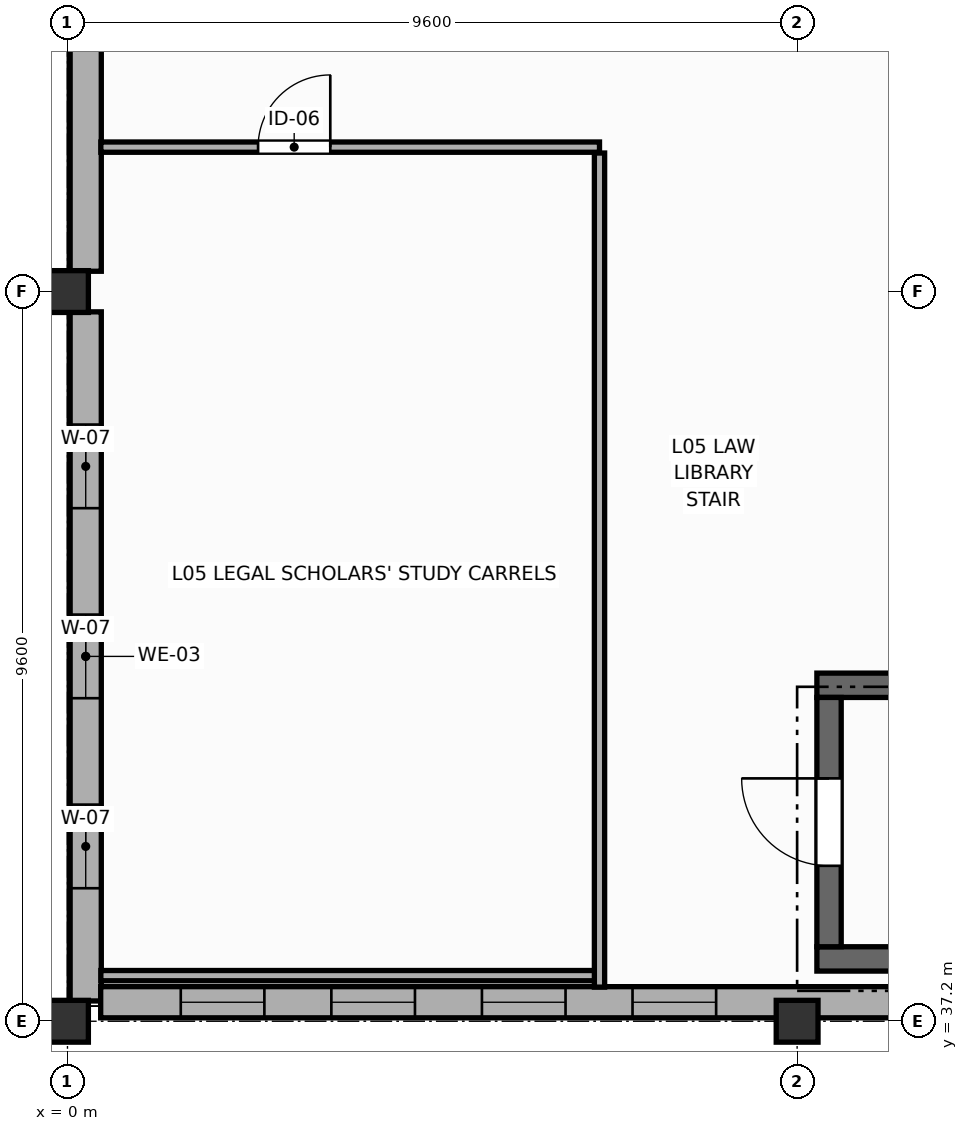
"""IFC4 building model, lengths in metres.
Left out: names, types, materials, properties, quantities, classifications, styles, units other than length and angle.
Written with IfcOpenShell. Run it as: python <this file> out.ifc"""

import sys

from ifc_helpers import new_model, si_unit, direction, frame, frame_2d, origin, origin_2d, place, context, subcontext, project, spatial, rectangle, extrude, element, fill, save


model = new_model("IFC4")
c1 = context("Model", 3, precision=1e-05, world=origin(), true_north=direction((0.0, 1.0)))
c2 = subcontext(c1, "Body", "Model", "MODEL_VIEW")
j1 = project(units=[si_unit("LENGTHUNIT", "METRE"), si_unit("PLANEANGLEUNIT", "RADIAN")], contexts=[c1])
p1 = place(None, origin())
s1 = spatial("IfcSite", under=j1, at=p1, CompositionType="ELEMENT")
p2 = place(p1, origin())
s2 = spatial("IfcBuilding", under=s1, at=p2, CompositionType="ELEMENT")
p3 = place(p2, frame((0.0, 0.0, 18.6)))
s3 = spatial("IfcBuildingStorey", under=s2, at=p3, CompositionType="ELEMENT", Elevation=18.6)
for number, where, z_axis, x_axis in (
    (1, (0.0, 37.2, 0.0), (0.0, 0.0, 1.0), (1.0, 0.0, 0.0)),
    (2, (0.0, 46.8, 0.0), (0.0, 0.0, 1.0), (1.0, 0.0, 0.0)),
    (3, (9.6, 37.2, 0.0), (0.0, 0.0, 1.0), (1.0, 0.0, 0.0)),
):
    element("IfcColumn", number, at=place(p3, frame(where, z_axis=z_axis, x_axis=x_axis)), inside=s3, PredefinedType="COLUMN", context=c2, shape_type="SweptSolid", body=[
        extrude(rectangle(XDim=0.55, YDim=0.55, at=origin_2d()), origin(), (0.0, 0.0, 1.0), 4.2),
    ])
p4 = place(p3, frame((0.24, 37.467, 0.0), z_axis=(0.0, 0.0, 1.0), x_axis=(0.0, 1.0, 0.0)))
e4 = element("IfcWall", 4, at=p4, inside=s3, PredefinedType="STANDARD", context=c2, shape_type="SweptSolid", body=[
    extrude(rectangle(XDim=9.066, YDim=0.41, at=frame_2d((4.533, 0.0))), origin(), (0.0, 0.0, 1.0), 3.14),
])
p5 = place(p4, frame((1.483, 0.0, 0.9)))
e5 = element("IfcOpeningElement", 5, at=p5, cuts=e4, PredefinedType="OPENING", context=c2, shape_type="SweptSolid", body=[
    extrude(rectangle(XDim=1.1, YDim=1.85, at=frame_2d((0.55, 0.925))), frame((0.0, 0.215, 0.0), z_axis=(0.0, -1.0, 0.0), x_axis=(1.0, 0.0, 0.0)), (0.0, 0.0, 1.0), 0.43),
])
p6 = place(p4, frame((3.983, 0.0, 0.9)))
e6 = element("IfcOpeningElement", 6, at=p6, cuts=e4, PredefinedType="OPENING", context=c2, shape_type="SweptSolid", body=[
    extrude(rectangle(XDim=1.1, YDim=1.85, at=frame_2d((0.55, 0.925))), frame((0.0, 0.215, 0.0), z_axis=(0.0, -1.0, 0.0), x_axis=(1.0, 0.0, 0.0)), (0.0, 0.0, 1.0), 0.43),
])
p7 = place(p4, frame((6.483, 0.0, 0.9)))
e7 = element("IfcOpeningElement", 7, at=p7, cuts=e4, PredefinedType="OPENING", context=c2, shape_type="SweptSolid", body=[
    extrude(rectangle(XDim=1.1, YDim=1.85, at=frame_2d((0.55, 0.925))), frame((0.0, 0.215, 0.0), z_axis=(0.0, -1.0, 0.0), x_axis=(1.0, 0.0, 0.0)), (0.0, 0.0, 1.0), 0.43),
])
p8 = place(p3, frame((0.24, 47.067, 0.0), z_axis=(0.0, 0.0, 1.0), x_axis=(0.0, 1.0, 0.0)))
e8 = element("IfcWall", 8, at=p8, inside=s3, PredefinedType="STANDARD", context=c2, shape_type="SweptSolid", body=[
    extrude(rectangle(XDim=9.066, YDim=0.41, at=frame_2d((4.533, 0.0))), origin(), (0.0, 0.0, 1.0), 3.14),
])
p9 = place(p8, frame((6.483, 0.0, 0.9)))
e9 = element("IfcOpeningElement", 9, at=p9, cuts=e8, PredefinedType="OPENING", context=c2, shape_type="SweptSolid", body=[
    extrude(rectangle(XDim=1.1, YDim=1.85, at=frame_2d((0.55, 0.925))), frame((0.0, 0.215, 0.0), z_axis=(0.0, -1.0, 0.0), x_axis=(1.0, 0.0, 0.0)), (0.0, 0.0, 1.0), 0.43),
])
p10 = place(p3, frame((33.3, 37.45, 0.0), z_axis=(0.0, 0.0, 1.0), x_axis=(-1.0, 0.0, 0.0)))
e10 = element("IfcWall", 10, at=p10, inside=s3, PredefinedType="STANDARD", context=c2, shape_type="SweptSolid", body=[
    extrude(rectangle(XDim=32.863, YDim=0.41, at=frame_2d((16.432, 0.0))), origin(), (0.0, 0.0, 1.0), 2.99),
])
p11 = place(p10, frame((0.99, 0.0, 0.9)))
e11 = element("IfcOpeningElement", 11, at=p11, cuts=e10, PredefinedType="OPENING", context=c2, shape_type="SweptSolid", body=[
    extrude(rectangle(XDim=1.1, YDim=1.85, at=frame_2d((0.55, 0.925))), frame((0.0, 0.215, 0.0), z_axis=(0.0, -1.0, 0.0), x_axis=(1.0, 0.0, 0.0)), (0.0, 0.0, 1.0), 0.43),
])
p12 = place(p10, frame((2.972, 0.0, 0.9)))
e12 = element("IfcOpeningElement", 12, at=p12, cuts=e10, PredefinedType="OPENING", context=c2, shape_type="SweptSolid", body=[
    extrude(rectangle(XDim=1.1, YDim=1.85, at=frame_2d((0.55, 0.925))), frame((0.0, 0.215, 0.0), z_axis=(0.0, -1.0, 0.0), x_axis=(1.0, 0.0, 0.0)), (0.0, 0.0, 1.0), 0.43),
])
p13 = place(p10, frame((4.953, 0.0, 0.9)))
e13 = element("IfcOpeningElement", 13, at=p13, cuts=e10, PredefinedType="OPENING", context=c2, shape_type="SweptSolid", body=[
    extrude(rectangle(XDim=1.1, YDim=1.85, at=frame_2d((0.55, 0.925))), frame((0.0, 0.215, 0.0), z_axis=(0.0, -1.0, 0.0), x_axis=(1.0, 0.0, 0.0)), (0.0, 0.0, 1.0), 0.43),
])
p14 = place(p10, frame((6.934, 0.0, 0.9)))
e14 = element("IfcOpeningElement", 14, at=p14, cuts=e10, PredefinedType="OPENING", context=c2, shape_type="SweptSolid", body=[
    extrude(rectangle(XDim=1.1, YDim=1.85, at=frame_2d((0.55, 0.925))), frame((0.0, 0.215, 0.0), z_axis=(0.0, -1.0, 0.0), x_axis=(1.0, 0.0, 0.0)), (0.0, 0.0, 1.0), 0.43),
])
p15 = place(p10, frame((10.897, 0.0, 0.9)))
e15 = element("IfcOpeningElement", 15, at=p15, cuts=e10, PredefinedType="OPENING", context=c2, shape_type="SweptSolid", body=[
    extrude(rectangle(XDim=1.1, YDim=1.85, at=frame_2d((0.55, 0.925))), frame((0.0, 0.215, 0.0), z_axis=(0.0, -1.0, 0.0), x_axis=(1.0, 0.0, 0.0)), (0.0, 0.0, 1.0), 0.43),
])
p16 = place(p10, frame((14.859, 0.0, 0.9)))
e16 = element("IfcOpeningElement", 16, at=p16, cuts=e10, PredefinedType="OPENING", context=c2, shape_type="SweptSolid", body=[
    extrude(rectangle(XDim=1.1, YDim=1.85, at=frame_2d((0.55, 0.925))), frame((0.0, 0.215, 0.0), z_axis=(0.0, -1.0, 0.0), x_axis=(1.0, 0.0, 0.0)), (0.0, 0.0, 1.0), 0.43),
])
p17 = place(p10, frame((16.841, 0.0, 0.9)))
e17 = element("IfcOpeningElement", 17, at=p17, cuts=e10, PredefinedType="OPENING", context=c2, shape_type="SweptSolid", body=[
    extrude(rectangle(XDim=1.1, YDim=1.85, at=frame_2d((0.55, 0.925))), frame((0.0, 0.215, 0.0), z_axis=(0.0, -1.0, 0.0), x_axis=(1.0, 0.0, 0.0)), (0.0, 0.0, 1.0), 0.43),
])
p18 = place(p10, frame((18.822, 0.0, 0.9)))
e18 = element("IfcOpeningElement", 18, at=p18, cuts=e10, PredefinedType="OPENING", context=c2, shape_type="SweptSolid", body=[
    extrude(rectangle(XDim=1.1, YDim=1.85, at=frame_2d((0.55, 0.925))), frame((0.0, 0.215, 0.0), z_axis=(0.0, -1.0, 0.0), x_axis=(1.0, 0.0, 0.0)), (0.0, 0.0, 1.0), 0.43),
])
p19 = place(p10, frame((20.803, 0.0, 0.9)))
e19 = element("IfcOpeningElement", 19, at=p19, cuts=e10, PredefinedType="OPENING", context=c2, shape_type="SweptSolid", body=[
    extrude(rectangle(XDim=1.1, YDim=1.85, at=frame_2d((0.55, 0.925))), frame((0.0, 0.215, 0.0), z_axis=(0.0, -1.0, 0.0), x_axis=(1.0, 0.0, 0.0)), (0.0, 0.0, 1.0), 0.43),
])
p20 = place(p10, frame((24.766, 0.0, 0.9)))
e20 = element("IfcOpeningElement", 20, at=p20, cuts=e10, PredefinedType="OPENING", context=c2, shape_type="SweptSolid", body=[
    extrude(rectangle(XDim=1.1, YDim=1.85, at=frame_2d((0.55, 0.925))), frame((0.0, 0.215, 0.0), z_axis=(0.0, -1.0, 0.0), x_axis=(1.0, 0.0, 0.0)), (0.0, 0.0, 1.0), 0.43),
])
p21 = place(p10, frame((26.747, 0.0, 0.9)))
e21 = element("IfcOpeningElement", 21, at=p21, cuts=e10, PredefinedType="OPENING", context=c2, shape_type="SweptSolid", body=[
    extrude(rectangle(XDim=1.1, YDim=1.85, at=frame_2d((0.55, 0.925))), frame((0.0, 0.215, 0.0), z_axis=(0.0, -1.0, 0.0), x_axis=(1.0, 0.0, 0.0)), (0.0, 0.0, 1.0), 0.43),
])
p22 = place(p10, frame((28.728, 0.0, 0.9)))
e22 = element("IfcOpeningElement", 22, at=p22, cuts=e10, PredefinedType="OPENING", context=c2, shape_type="SweptSolid", body=[
    extrude(rectangle(XDim=1.1, YDim=1.85, at=frame_2d((0.55, 0.925))), frame((0.0, 0.215, 0.0), z_axis=(0.0, -1.0, 0.0), x_axis=(1.0, 0.0, 0.0)), (0.0, 0.0, 1.0), 0.43),
])
p23 = place(p10, frame((30.709, 0.0, 0.9)))
e23 = element("IfcOpeningElement", 23, at=p23, cuts=e10, PredefinedType="OPENING", context=c2, shape_type="SweptSolid", body=[
    extrude(rectangle(XDim=1.1, YDim=1.85, at=frame_2d((0.55, 0.925))), frame((0.0, 0.215, 0.0), z_axis=(0.0, -1.0, 0.0), x_axis=(1.0, 0.0, 0.0)), (0.0, 0.0, 1.0), 0.43),
])
for number, where, z_axis, x_axis in (
    (24, (9.86, 41.62, 0.0), (0.0, 0.0, 1.0), (1.0, 0.0, 0.0)),
    (25, (18.74, 38.02, 0.0), (0.0, 0.0, 1.0), (-1.0, 0.0, 0.0)),
):
    element("IfcWall", number, at=place(p3, frame(where, z_axis=z_axis, x_axis=x_axis)), inside=s3, PredefinedType="SHEAR", context=c2, shape_type="SweptSolid", body=[
        extrude(rectangle(XDim=8.88, YDim=0.32, at=frame_2d((4.44, 0.0))), origin(), (0.0, 0.0, 1.0), 3.96),
    ])
p24 = place(p3, frame((10.02, 38.18, 0.0), z_axis=(0.0, 0.0, 1.0), x_axis=(0.0, 1.0, 0.0)))
e26 = element("IfcWall", 26, at=p24, inside=s3, PredefinedType="SHEAR", context=c2, shape_type="SweptSolid", body=[
    extrude(rectangle(XDim=3.28, YDim=0.32, at=frame_2d((1.64, 0.0))), origin(), (0.0, 0.0, 1.0), 3.96),
])
p25 = place(p24, frame((1.065, 0.0, 0.0)))
e27 = element("IfcOpeningElement", 27, at=p25, cuts=e26, PredefinedType="OPENING", context=c2, shape_type="SweptSolid", body=[
    extrude(rectangle(XDim=1.15, YDim=2.2, at=frame_2d((0.575, 1.1))), frame((0.0, 0.17, 0.0), z_axis=(0.0, -1.0, 0.0), x_axis=(1.0, 0.0, 0.0)), (0.0, 0.0, 1.0), 0.34),
])
p26 = place(p3, frame((0.439, 48.7, 0.0), z_axis=(0.0, 0.0, 1.0), x_axis=(1.0, 0.0, 0.0)))
e28 = element("IfcWall", 28, at=p26, inside=s3, PredefinedType="PARTITIONING", context=c2, shape_type="SweptSolid", body=[
    extrude(rectangle(XDim=6.561, YDim=0.135, at=frame_2d((3.281, 0.0))), origin(), (0.0, 0.0, 1.0), 3.14),
])
p27 = place(p26, frame((2.069, 0.0, 0.0)))
e29 = element("IfcOpeningElement", 29, at=p27, cuts=e28, PredefinedType="OPENING", context=c2, shape_type="SweptSolid", body=[
    extrude(rectangle(XDim=0.95, YDim=2.15, at=frame_2d((0.475, 1.075))), frame((0.0, 0.077, 0.0), z_axis=(0.0, -1.0, 0.0), x_axis=(1.0, 0.0, 0.0)), (0.0, 0.0, 1.0), 0.155),
])
p28 = place(p3, frame((7.0, 37.8, 0.0), z_axis=(0.0, 0.0, 1.0), x_axis=(-1.0, 0.0, 0.0)))
e30 = element("IfcWall", 30, at=p28, inside=s3, PredefinedType="PARTITIONING", context=c2, shape_type="SweptSolid", body=[
    extrude(rectangle(XDim=6.561, YDim=0.135, at=frame_2d((3.281, 0.0))), origin(), (0.0, 0.0, 1.0), 3.14),
])
p29 = place(p3, frame((7.0, 48.623, 0.0), z_axis=(0.0, 0.0, 1.0), x_axis=(0.0, -1.0, 0.0)))
e31 = element("IfcWall", 31, at=p29, inside=s3, PredefinedType="PARTITIONING", context=c2, shape_type="SweptSolid", body=[
    extrude(rectangle(XDim=10.974, YDim=0.135, at=frame_2d((5.487, 0.0))), origin(), (0.0, 0.0, 1.0), 3.945),
])
p30 = place(p5, origin())
e32 = element("IfcWindow", 32, at=p30, inside=s3, PartitioningType="SINGLE_PANEL", PredefinedType="WINDOW", context=c2, shape_type="SweptSolid", body=[
    extrude(rectangle(XDim=1.1, YDim=1.85, at=frame_2d((0.55, 0.925))), frame((0.0, 0.03, 0.0), z_axis=(0.0, -1.0, 0.0), x_axis=(1.0, 0.0, 0.0)), (0.0, 0.0, 1.0), 0.06),
])
fill(e5, e32)
p31 = place(p6, origin())
e33 = element("IfcWindow", 33, at=p31, inside=s3, PartitioningType="SINGLE_PANEL", PredefinedType="WINDOW", context=c2, shape_type="SweptSolid", body=[
    extrude(rectangle(XDim=1.1, YDim=1.85, at=frame_2d((0.55, 0.925))), frame((0.0, 0.03, 0.0), z_axis=(0.0, -1.0, 0.0), x_axis=(1.0, 0.0, 0.0)), (0.0, 0.0, 1.0), 0.06),
])
fill(e6, e33)
p32 = place(p7, origin())
e34 = element("IfcWindow", 34, at=p32, inside=s3, PartitioningType="SINGLE_PANEL", PredefinedType="WINDOW", context=c2, shape_type="SweptSolid", body=[
    extrude(rectangle(XDim=1.1, YDim=1.85, at=frame_2d((0.55, 0.925))), frame((0.0, 0.03, 0.0), z_axis=(0.0, -1.0, 0.0), x_axis=(1.0, 0.0, 0.0)), (0.0, 0.0, 1.0), 0.06),
])
fill(e7, e34)
p33 = place(p20, origin())
e35 = element("IfcWindow", 35, at=p33, inside=s3, PartitioningType="SINGLE_PANEL", PredefinedType="WINDOW", context=c2, shape_type="SweptSolid", body=[
    extrude(rectangle(XDim=1.1, YDim=1.85, at=frame_2d((0.55, 0.925))), frame((0.0, 0.03, 0.0), z_axis=(0.0, -1.0, 0.0), x_axis=(1.0, 0.0, 0.0)), (0.0, 0.0, 1.0), 0.06),
])
fill(e20, e35)
p34 = place(p21, origin())
e36 = element("IfcWindow", 36, at=p34, inside=s3, PartitioningType="SINGLE_PANEL", PredefinedType="WINDOW", context=c2, shape_type="SweptSolid", body=[
    extrude(rectangle(XDim=1.1, YDim=1.85, at=frame_2d((0.55, 0.925))), frame((0.0, 0.03, 0.0), z_axis=(0.0, -1.0, 0.0), x_axis=(1.0, 0.0, 0.0)), (0.0, 0.0, 1.0), 0.06),
])
fill(e21, e36)
p35 = place(p22, origin())
e37 = element("IfcWindow", 37, at=p35, inside=s3, PartitioningType="SINGLE_PANEL", PredefinedType="WINDOW", context=c2, shape_type="SweptSolid", body=[
    extrude(rectangle(XDim=1.1, YDim=1.85, at=frame_2d((0.55, 0.925))), frame((0.0, 0.03, 0.0), z_axis=(0.0, -1.0, 0.0), x_axis=(1.0, 0.0, 0.0)), (0.0, 0.0, 1.0), 0.06),
])
fill(e22, e37)
p36 = place(p23, origin())
e38 = element("IfcWindow", 38, at=p36, inside=s3, PartitioningType="SINGLE_PANEL", PredefinedType="WINDOW", context=c2, shape_type="SweptSolid", body=[
    extrude(rectangle(XDim=1.1, YDim=1.85, at=frame_2d((0.55, 0.925))), frame((0.0, 0.03, 0.0), z_axis=(0.0, -1.0, 0.0), x_axis=(1.0, 0.0, 0.0)), (0.0, 0.0, 1.0), 0.06),
])
fill(e23, e38)
p37 = place(p25, origin())
e39 = element("IfcDoor", 39, at=p37, inside=s3, OperationType="SINGLE_SWING_RIGHT", PredefinedType="DOOR", context=c2, shape_type="SweptSolid", body=[
    extrude(rectangle(XDim=1.15, YDim=2.2, at=frame_2d((0.575, 1.1))), frame((0.0, 0.025, 0.0), z_axis=(0.0, -1.0, 0.0), x_axis=(1.0, 0.0, 0.0)), (0.0, 0.0, 1.0), 0.05),
])
fill(e27, e39)
p38 = place(p27, origin())
e40 = element("IfcDoor", 40, at=p38, inside=s3, OperationType="SINGLE_SWING_RIGHT", PredefinedType="DOOR", context=c2, shape_type="SweptSolid", body=[
    extrude(rectangle(XDim=0.95, YDim=2.15, at=frame_2d((0.475, 1.075))), frame((0.0, 0.025, 0.0), z_axis=(0.0, -1.0, 0.0), x_axis=(1.0, 0.0, 0.0)), (0.0, 0.0, 1.0), 0.05),
])
fill(e29, e40)
save(model, sys.argv[1])
